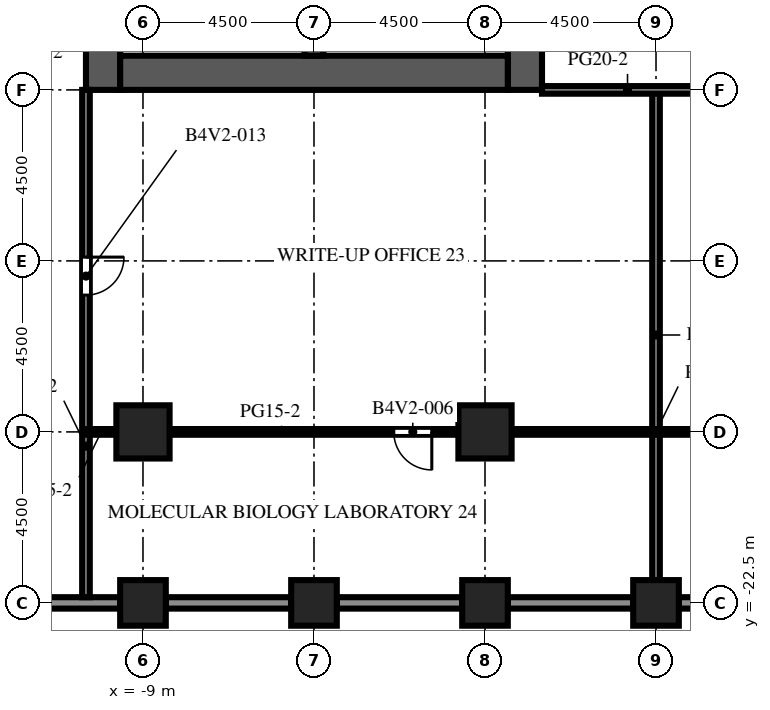
"""IFC4 building model, lengths in metres.
Left out: names, types, materials, properties, quantities, classifications, styles, units other than length and angle.
Written with IfcOpenShell. Run it as: python <this file> out.ifc"""

import sys

from ifc_helpers import new_model, si_unit, direction, frame, frame_2d, origin, origin_2d, place, context, subcontext, project, spatial, rectangle, extrude, element, fill, save


model = new_model("IFC4")
c1 = context("Model", 3, precision=1e-05, world=origin(), true_north=direction((0.0, 1.0)))
c2 = subcontext(c1, "Body", "Model", "MODEL_VIEW")
j1 = project(units=[si_unit("LENGTHUNIT", "METRE"), si_unit("PLANEANGLEUNIT", "RADIAN")], contexts=[c1])
p1 = place(None, origin())
s1 = spatial("IfcSite", under=j1, at=p1, CompositionType="ELEMENT")
p2 = place(p1, origin())
s2 = spatial("IfcBuilding", under=s1, at=p2, CompositionType="ELEMENT")
p3 = place(p2, frame((0.0, 0.0, 141.3)))
s3 = spatial("IfcBuildingStorey", under=s2, at=p3, CompositionType="ELEMENT", Elevation=141.3)
for number, where, z_axis, x_axis in (
    (1, (-9.0, -22.5, 0.0), (0.0, 0.0, 1.0), (1.0, 0.0, 0.0)),
    (2, (-4.5, -22.5, 0.0), (0.0, 0.0, 1.0), (1.0, 0.0, 0.0)),
    (3, (0.0, -22.5, 0.0), (0.0, 0.0, 1.0), (1.0, 0.0, 0.0)),
    (4, (4.5, -22.5, 0.0), (0.0, 0.0, 1.0), (1.0, 0.0, 0.0)),
):
    element("IfcColumn", number, at=place(p3, frame(where, z_axis=z_axis, x_axis=x_axis)), inside=s3, PredefinedType="COLUMN", context=c2, shape_type="SweptSolid", body=[
        extrude(rectangle(XDim=1.2, YDim=1.2, at=origin_2d()), origin(), (0.0, 0.0, 1.0), 4.1),
    ])
for number, where, z_axis, x_axis in (
    (5, (-9.0, -18.0, 0.0), (0.0, 0.0, 1.0), (1.0, 0.0, 0.0)),
    (6, (0.0, -18.0, 0.0), (0.0, 0.0, 1.0), (1.0, 0.0, 0.0)),
):
    element("IfcColumn", number, at=place(p3, frame(where, z_axis=z_axis, x_axis=x_axis)), inside=s3, PredefinedType="COLUMN", context=c2, shape_type="SweptSolid", body=[
        extrude(rectangle(XDim=1.4, YDim=1.4, at=origin_2d()), origin(), (0.0, 0.0, 1.0), 4.1),
    ])
p4 = place(p3, frame((-10.05, -9.0, 0.0), z_axis=(0.0, 0.0, 1.0), x_axis=(0.0, 1.0, 0.0)))
e7 = element("IfcWall", 7, at=p4, inside=s3, PredefinedType="SHEAR", context=c2, shape_type="SweptSolid", body=[
    extrude(rectangle(XDim=27.5, YDim=0.9, at=frame_2d((13.75, 0.0))), origin(), (0.0, 0.0, 1.0), 4.1),
])
p5 = place(p4, frame((12.55, 0.0, 0.0)))
e8 = element("IfcOpeningElement", 8, at=p5, cuts=e7, PredefinedType="OPENING", context=c2, shape_type="SweptSolid", body=[
    extrude(rectangle(XDim=2.4, YDim=2.4, at=frame_2d((1.2, 1.2))), frame((0.0, 0.46, 0.0), z_axis=(0.0, -1.0, 0.0), x_axis=(1.0, 0.0, 0.0)), (0.0, 0.0, 1.0), 0.92),
])
p6 = place(p4, frame((6.825, 0.0, 0.0)))
e9 = element("IfcOpeningElement", 9, at=p6, cuts=e7, PredefinedType="OPENING", context=c2, shape_type="SweptSolid", body=[
    extrude(rectangle(XDim=1.2, YDim=2.1, at=frame_2d((0.6, 1.05))), frame((0.0, 0.46, 0.0), z_axis=(0.0, -1.0, 0.0), x_axis=(1.0, 0.0, 0.0)), (0.0, 0.0, 1.0), 0.92),
])
p7 = place(p4, frame((19.475, 0.0, 0.0)))
e10 = element("IfcOpeningElement", 10, at=p7, cuts=e7, PredefinedType="OPENING", context=c2, shape_type="SweptSolid", body=[
    extrude(rectangle(XDim=1.2, YDim=2.1, at=frame_2d((0.6, 1.05))), frame((0.0, 0.46, 0.0), z_axis=(0.0, -1.0, 0.0), x_axis=(1.0, 0.0, 0.0)), (0.0, 0.0, 1.0), 0.92),
])
p8 = place(p3, frame((1.05, -9.0, 0.0), z_axis=(0.0, 0.0, 1.0), x_axis=(0.0, 1.0, 0.0)))
e11 = element("IfcWall", 11, at=p8, inside=s3, PredefinedType="SHEAR", context=c2, shape_type="SweptSolid", body=[
    extrude(rectangle(XDim=27.5, YDim=0.9, at=frame_2d((13.75, 0.0))), origin(), (0.0, 0.0, 1.0), 4.1),
])
p9 = place(p8, frame((12.55, 0.0, 0.0)))
e12 = element("IfcOpeningElement", 12, at=p9, cuts=e11, PredefinedType="OPENING", context=c2, shape_type="SweptSolid", body=[
    extrude(rectangle(XDim=2.4, YDim=2.4, at=frame_2d((1.2, 1.2))), frame((0.0, 0.46, 0.0), z_axis=(0.0, -1.0, 0.0), x_axis=(1.0, 0.0, 0.0)), (0.0, 0.0, 1.0), 0.92),
])
p10 = place(p8, frame((5.51, 0.0, 0.0)))
e13 = element("IfcOpeningElement", 13, at=p10, cuts=e11, PredefinedType="OPENING", context=c2, shape_type="SweptSolid", body=[
    extrude(rectangle(XDim=0.923, YDim=2.1, at=frame_2d((0.461, 1.05))), frame((0.0, 0.46, 0.0), z_axis=(0.0, -1.0, 0.0), x_axis=(1.0, 0.0, 0.0)), (0.0, 0.0, 1.0), 0.92),
])
p11 = place(p8, frame((23.427, 0.0, 0.0)))
e14 = element("IfcOpeningElement", 14, at=p11, cuts=e11, PredefinedType="OPENING", context=c2, shape_type="SweptSolid", body=[
    extrude(rectangle(XDim=1.2, YDim=2.1, at=frame_2d((0.6, 1.05))), frame((0.0, 0.46, 0.0), z_axis=(0.0, -1.0, 0.0), x_axis=(1.0, 0.0, 0.0)), (0.0, 0.0, 1.0), 0.92),
])
p12 = place(p3, frame((-9.6, -8.55, 0.0), z_axis=(0.0, 0.0, 1.0), x_axis=(1.0, 0.0, 0.0)))
e15 = element("IfcWall", 15, at=p12, inside=s3, PredefinedType="SHEAR", context=c2, shape_type="SweptSolid", body=[
    extrude(rectangle(XDim=10.2, YDim=0.9, at=frame_2d((5.1, 0.0))), origin(), (0.0, 0.0, 1.0), 4.1),
])
p13 = place(p3, frame((-4.5, -8.1, 0.0), z_axis=(0.0, 0.0, 1.0), x_axis=(0.0, 1.0, 0.0)))
e16 = element("IfcWall", 16, at=p13, inside=s3, PredefinedType="SHEAR", context=c2, shape_type="SweptSolid", body=[
    extrude(rectangle(XDim=7.35, YDim=0.5, at=frame_2d((3.675, 0.0))), origin(), (0.0, 0.0, 1.0), 4.1),
])
for number, where, z_axis, x_axis in (
    (17, (-9.6, -22.5, 0.0), (0.0, 0.0, 1.0), (-1.0, 0.0, 0.0)),
    (18, (-5.1, -22.5, 0.0), (0.0, 0.0, 1.0), (-1.0, 0.0, 0.0)),
    (19, (-0.6, -22.5, 0.0), (0.0, 0.0, 1.0), (-1.0, 0.0, 0.0)),
    (20, (3.9, -22.5, 0.0), (0.0, 0.0, 1.0), (-1.0, 0.0, 0.0)),
    (21, (8.4, -22.5, 0.0), (0.0, 0.0, 1.0), (-1.0, 0.0, 0.0)),
):
    element("IfcWall", number, at=place(p3, frame(where, z_axis=z_axis, x_axis=x_axis)), inside=s3, PredefinedType="SOLIDWALL", context=c2, shape_type="SweptSolid", body=[
        extrude(rectangle(XDim=3.3, YDim=0.3, at=frame_2d((1.65, 0.0))), origin(), (0.0, 0.0, 1.0), 2.6),
    ])
p14 = place(p3, frame((-1.825, -8.1, 0.0), z_axis=(0.0, 0.0, 1.0), x_axis=(0.0, 1.0, 0.0)))
e22 = element("IfcWall", 22, at=p14, inside=s3, PredefinedType="PARTITIONING", context=c2, shape_type="SweptSolid", body=[
    extrude(rectangle(XDim=4.41, YDim=0.1, at=frame_2d((2.205, 0.0))), origin(), (0.0, 0.0, 1.0), 3.5),
])
p15 = place(p3, frame((-10.5, -9.0, 0.0), z_axis=(0.0, 0.0, 1.0), x_axis=(0.0, -1.0, 0.0)))
e23 = element("IfcWall", 23, at=p15, inside=s3, PredefinedType="PARTITIONING", context=c2, shape_type="SweptSolid", body=[
    extrude(rectangle(XDim=13.35, YDim=0.2, at=frame_2d((6.675, 0.0))), origin(), (0.0, 0.0, 1.0), 3.5),
])
p16 = place(p15, frame((4.4, 0.0, 0.0)))
e24 = element("IfcOpeningElement", 24, at=p16, cuts=e23, PredefinedType="OPENING", context=c2, shape_type="SweptSolid", body=[
    extrude(rectangle(XDim=1.0, YDim=2.1, at=frame_2d((0.5, 1.05))), frame((0.0, 0.11, 0.0), z_axis=(0.0, -1.0, 0.0), x_axis=(1.0, 0.0, 0.0)), (0.0, 0.0, 1.0), 0.22),
])
p17 = place(p3, frame((4.5, -21.9, 0.0), z_axis=(0.0, 0.0, 1.0), x_axis=(0.0, 1.0, 0.0)))
e25 = element("IfcWall", 25, at=p17, inside=s3, PredefinedType="PARTITIONING", context=c2, shape_type="SweptSolid", body=[
    extrude(rectangle(XDim=12.9, YDim=0.2, at=frame_2d((6.45, 0.0))), origin(), (0.0, 0.0, 1.0), 3.5),
])
p18 = place(p3, frame((-10.5, -18.0, 0.0), z_axis=(0.0, 0.0, 1.0), x_axis=(1.0, 0.0, 0.0)))
e26 = element("IfcWall", 26, at=p18, inside=s3, PredefinedType="PARTITIONING", context=c2, shape_type="SweptSolid", body=[
    extrude(rectangle(XDim=0.8, YDim=0.15, at=frame_2d((0.4, 0.0))), origin(), (0.0, 0.0, 1.0), 3.5),
])
p19 = place(p3, frame((-0.7, -18.0, 0.0), z_axis=(0.0, 0.0, 1.0), x_axis=(-1.0, 0.0, 0.0)))
e27 = element("IfcWall", 27, at=p19, inside=s3, PredefinedType="PARTITIONING", context=c2, shape_type="SweptSolid", body=[
    extrude(rectangle(XDim=7.6, YDim=0.15, at=frame_2d((3.8, 0.0))), origin(), (0.0, 0.0, 1.0), 3.5),
])
p20 = place(p19, frame((0.7, 0.0, 0.0)))
e28 = element("IfcOpeningElement", 28, at=p20, cuts=e27, PredefinedType="OPENING", context=c2, shape_type="SweptSolid", body=[
    extrude(rectangle(XDim=1.0, YDim=2.1, at=frame_2d((0.5, 1.05))), frame((0.0, 0.085, 0.0), z_axis=(0.0, -1.0, 0.0), x_axis=(1.0, 0.0, 0.0)), (0.0, 0.0, 1.0), 0.17),
])
p21 = place(p3, frame((0.7, -18.0, 0.0), z_axis=(0.0, 0.0, 1.0), x_axis=(1.0, 0.0, 0.0)))
e29 = element("IfcWall", 29, at=p21, inside=s3, PredefinedType="PARTITIONING", context=c2, shape_type="SweptSolid", body=[
    extrude(rectangle(XDim=7.6, YDim=0.15, at=frame_2d((3.8, 0.0))), origin(), (0.0, 0.0, 1.0), 3.5),
])
p22 = place(p3, frame((1.5, -9.0, 0.0), z_axis=(0.0, 0.0, 1.0), x_axis=(1.0, 0.0, 0.0)))
e30 = element("IfcWall", 30, at=p22, inside=s3, PredefinedType="PARTITIONING", context=c2, shape_type="SweptSolid", body=[
    extrude(rectangle(XDim=4.5, YDim=0.2, at=frame_2d((2.25, 0.0))), origin(), (0.0, 0.0, 1.0), 3.5),
])
p23 = place(p20, origin())
e31 = element("IfcDoor", 31, at=p23, inside=s3, OperationType="SINGLE_SWING_LEFT", PredefinedType="DOOR", context=c2, shape_type="SweptSolid", body=[
    extrude(rectangle(XDim=1.0, YDim=2.1, at=frame_2d((0.5, 1.05))), frame((0.0, 0.025, 0.0), z_axis=(0.0, -1.0, 0.0), x_axis=(1.0, 0.0, 0.0)), (0.0, 0.0, 1.0), 0.05),
])
fill(e28, e31)
p24 = place(p16, origin())
e32 = element("IfcDoor", 32, at=p24, inside=s3, OperationType="SINGLE_SWING_LEFT", PredefinedType="DOOR", context=c2, shape_type="SweptSolid", body=[
    extrude(rectangle(XDim=1.0, YDim=2.1, at=frame_2d((0.5, 1.05))), frame((0.0, 0.025, 0.0), z_axis=(0.0, -1.0, 0.0), x_axis=(1.0, 0.0, 0.0)), (0.0, 0.0, 1.0), 0.05),
])
fill(e24, e32)
save(model, sys.argv[1])
